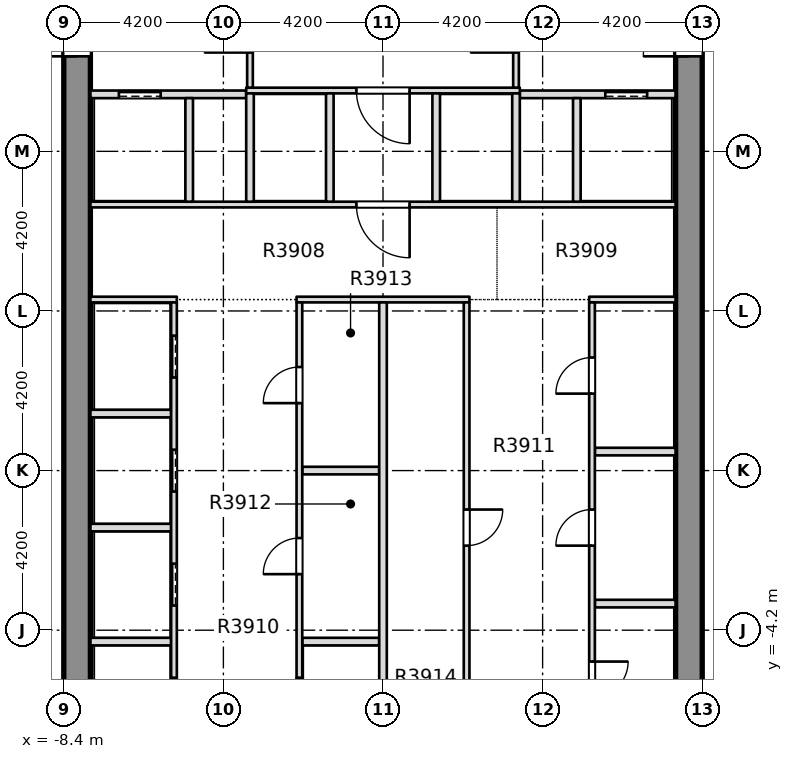
"""IFC4 building model, lengths in metres.
Left out: names, types, materials, properties, quantities, classifications, styles, units other than length and angle.
Written with IfcOpenShell. Run it as: python <this file> out.ifc"""

import sys

from ifc_helpers import new_model, si_unit, direction, frame, frame_2d, origin, place, context, subcontext, project, spatial, rectangle, extrude, element, fill, save


model = new_model("IFC4")
c1 = context("Model", 3, precision=1e-05, world=origin(), true_north=direction((0.0, 1.0)))
c2 = subcontext(c1, "Body", "Model", "MODEL_VIEW")
j1 = project(units=[si_unit("LENGTHUNIT", "METRE"), si_unit("PLANEANGLEUNIT", "RADIAN")], contexts=[c1])
p1 = place(None, origin())
s1 = spatial("IfcSite", under=j1, at=p1, CompositionType="ELEMENT")
p2 = place(p1, origin())
s2 = spatial("IfcBuilding", under=s1, at=p2, CompositionType="ELEMENT")
p3 = place(p2, frame((0.0, 0.0, 153.8)))
s3 = spatial("IfcBuildingStorey", under=s2, at=p3, CompositionType="ELEMENT", Elevation=153.8)
p4 = place(p3, frame((8.05, -8.4, -0.4), z_axis=(0.0, 0.0, 1.0), x_axis=(0.0, 1.0, 0.0)))
e1 = element("IfcWall", 1, at=p4, inside=s3, PredefinedType="SOLIDWALL", context=c2, shape_type="SweptSolid", body=[
    extrude(rectangle(XDim=30.15, YDim=0.7, at=frame_2d((15.075, 0.0))), origin(), (0.0, 0.0, 1.0), 3.45),
])
p5 = place(p4, frame((19.3, 0.0, 0.4)))
e2 = element("IfcOpeningElement", 2, at=p5, cuts=e1, PredefinedType="OPENING", context=c2, shape_type="SweptSolid", body=[
    extrude(rectangle(XDim=1.2, YDim=2.1, at=frame_2d((0.6, 1.05))), frame((0.0, 0.36, 0.0), z_axis=(0.0, -1.0, 0.0), x_axis=(1.0, 0.0, 0.0)), (0.0, 0.0, 1.0), 0.72),
])
p6 = place(p3, frame((-8.05, -8.4, -0.4), z_axis=(0.0, 0.0, 1.0), x_axis=(0.0, 1.0, 0.0)))
e3 = element("IfcWall", 3, at=p6, inside=s3, PredefinedType="SOLIDWALL", context=c2, shape_type="SweptSolid", body=[
    extrude(rectangle(XDim=30.15, YDim=0.7, at=frame_2d((15.075, 0.0))), origin(), (0.0, 0.0, 1.0), 3.45),
])
p7 = place(p6, frame((19.3, 0.0, 0.4)))
e4 = element("IfcOpeningElement", 4, at=p7, cuts=e3, PredefinedType="OPENING", context=c2, shape_type="SweptSolid", body=[
    extrude(rectangle(XDim=1.2, YDim=2.1, at=frame_2d((0.6, 1.05))), frame((0.0, 0.36, 0.0), z_axis=(0.0, -1.0, 0.0), x_axis=(1.0, 0.0, 0.0)), (0.0, 0.0, 1.0), 0.72),
])
p8 = place(p3, frame((-7.699, -4.5, 0.0), z_axis=(0.0, 0.0, 1.0), x_axis=(1.0, 0.0, 0.0)))
e5 = element("IfcWall", 5, at=p8, inside=s3, PredefinedType="PARTITIONING", context=c2, shape_type="SweptSolid", body=[
    extrude(rectangle(XDim=2.124, YDim=0.2, at=frame_2d((1.062, 0.0))), origin(), (0.0, 0.0, 1.0), 3.05),
])
p9 = place(p3, frame((-2.125, -4.5, 0.0), z_axis=(0.0, 0.0, 1.0), x_axis=(1.0, 0.0, 0.0)))
e6 = element("IfcWall", 6, at=p9, inside=s3, PredefinedType="PARTITIONING", context=c2, shape_type="SweptSolid", body=[
    extrude(rectangle(XDim=2.025, YDim=0.2, at=frame_2d((1.012, 0.0))), origin(), (0.0, 0.0, 1.0), 3.05),
])
for number, where, z_axis, x_axis in (
    (7, (5.575, -3.5, 0.0), (0.0, 0.0, 1.0), (1.0, 0.0, 0.0)),
    (8, (-7.699, -1.5, 0.0), (0.0, 0.0, 1.0), (1.0, 0.0, 0.0)),
):
    element("IfcWall", number, at=place(p3, frame(where, z_axis=z_axis, x_axis=x_axis)), inside=s3, PredefinedType="PARTITIONING", context=c2, shape_type="SweptSolid", body=[
        extrude(rectangle(XDim=2.124, YDim=0.2, at=frame_2d((1.062, 0.0))), origin(), (0.0, 0.0, 1.0), 3.05),
    ])
p10 = place(p3, frame((-2.125, 0.0, 0.0), z_axis=(0.0, 0.0, 1.0), x_axis=(1.0, 0.0, 0.0)))
e9 = element("IfcWall", 9, at=p10, inside=s3, PredefinedType="PARTITIONING", context=c2, shape_type="SweptSolid", body=[
    extrude(rectangle(XDim=2.025, YDim=0.2, at=frame_2d((1.012, 0.0))), origin(), (0.0, 0.0, 1.0), 3.05),
])
for number, where, z_axis, x_axis in (
    (10, (5.575, 0.5, 0.0), (0.0, 0.0, 1.0), (1.0, 0.0, 0.0)),
    (11, (-7.699, 1.5, 0.0), (0.0, 0.0, 1.0), (1.0, 0.0, 0.0)),
):
    element("IfcWall", number, at=place(p3, frame(where, z_axis=z_axis, x_axis=x_axis)), inside=s3, PredefinedType="PARTITIONING", context=c2, shape_type="SweptSolid", body=[
        extrude(rectangle(XDim=2.124, YDim=0.2, at=frame_2d((1.062, 0.0))), origin(), (0.0, 0.0, 1.0), 3.05),
    ])
p11 = place(p3, frame((-7.699, 4.5, 0.0), z_axis=(0.0, 0.0, 1.0), x_axis=(1.0, 0.0, 0.0)))
e12 = element("IfcWall", 12, at=p11, inside=s3, PredefinedType="PARTITIONING", context=c2, shape_type="SweptSolid", body=[
    extrude(rectangle(XDim=2.274, YDim=0.15, at=frame_2d((1.137, 0.0))), origin(), (0.0, 0.0, 1.0), 3.05),
])
p12 = place(p3, frame((-2.275, 4.5, 0.0), z_axis=(0.0, 0.0, 1.0), x_axis=(1.0, 0.0, 0.0)))
e13 = element("IfcWall", 13, at=p12, inside=s3, PredefinedType="PARTITIONING", context=c2, shape_type="SweptSolid", body=[
    extrude(rectangle(XDim=4.55, YDim=0.15, at=frame_2d((2.275, 0.0))), origin(), (0.0, 0.0, 1.0), 3.05),
])
p13 = place(p3, frame((5.425, 4.5, 0.0), z_axis=(0.0, 0.0, 1.0), x_axis=(1.0, 0.0, 0.0)))
e14 = element("IfcWall", 14, at=p13, inside=s3, PredefinedType="PARTITIONING", context=c2, shape_type="SweptSolid", body=[
    extrude(rectangle(XDim=2.274, YDim=0.15, at=frame_2d((1.137, 0.0))), origin(), (0.0, 0.0, 1.0), 3.05),
])
p14 = place(p3, frame((-7.699, 7.0, 0.0), z_axis=(0.0, 0.0, 1.0), x_axis=(1.0, 0.0, 0.0)))
e15 = element("IfcWall", 15, at=p14, inside=s3, PredefinedType="PARTITIONING", context=c2, shape_type="SweptSolid", body=[
    extrude(rectangle(XDim=15.398, YDim=0.15, at=frame_2d((7.699, 0.0))), origin(), (0.0, 0.0, 1.0), 3.05),
])
p15 = place(p14, frame((6.999, 0.0, 0.0)))
e16 = element("IfcOpeningElement", 16, at=p15, cuts=e15, PredefinedType="OPENING", context=c2, shape_type="SweptSolid", body=[
    extrude(rectangle(XDim=1.4, YDim=2.1, at=frame_2d((0.7, 1.05))), frame((0.0, 0.085, 0.0), z_axis=(0.0, -1.0, 0.0), x_axis=(1.0, 0.0, 0.0)), (0.0, 0.0, 1.0), 0.17),
])
p16 = place(p3, frame((-7.699, 9.9, 0.0), z_axis=(0.0, 0.0, 1.0), x_axis=(1.0, 0.0, 0.0)))
e17 = element("IfcWall", 17, at=p16, inside=s3, PredefinedType="PARTITIONING", context=c2, shape_type="SweptSolid", body=[
    extrude(rectangle(XDim=4.099, YDim=0.2, at=frame_2d((2.049, 0.0))), origin(), (0.0, 0.0, 1.0), 3.05),
])
p17 = place(p16, frame((0.749, 0.0, 0.0)))
e18 = element("IfcOpeningElement", 18, at=p17, cuts=e17, PredefinedType="OPENING", context=c2, shape_type="SweptSolid", body=[
    extrude(rectangle(XDim=1.1, YDim=2.1, at=frame_2d((0.55, 1.05))), frame((0.0, 0.11, 0.0), z_axis=(0.0, -1.0, 0.0), x_axis=(1.0, 0.0, 0.0)), (0.0, 0.0, 1.0), 0.22),
])
p18 = place(p3, frame((3.6, 9.9, 0.0), z_axis=(0.0, 0.0, 1.0), x_axis=(1.0, 0.0, 0.0)))
e19 = element("IfcWall", 19, at=p18, inside=s3, PredefinedType="PARTITIONING", context=c2, shape_type="SweptSolid", body=[
    extrude(rectangle(XDim=4.099, YDim=0.2, at=frame_2d((2.049, 0.0))), origin(), (0.0, 0.0, 1.0), 3.05),
])
p19 = place(p18, frame((2.25, 0.0, 0.0)))
e20 = element("IfcOpeningElement", 20, at=p19, cuts=e19, PredefinedType="OPENING", context=c2, shape_type="SweptSolid", body=[
    extrude(rectangle(XDim=1.1, YDim=2.1, at=frame_2d((0.55, 1.05))), frame((0.0, 0.11, 0.0), z_axis=(0.0, -1.0, 0.0), x_axis=(1.0, 0.0, 0.0)), (0.0, 0.0, 1.0), 0.22),
])
p20 = place(p3, frame((-3.6, 10.0, 0.0), z_axis=(0.0, 0.0, 1.0), x_axis=(1.0, 0.0, 0.0)))
e21 = element("IfcWall", 21, at=p20, inside=s3, PredefinedType="PARTITIONING", context=c2, shape_type="SweptSolid", body=[
    extrude(rectangle(XDim=7.2, YDim=0.15, at=frame_2d((3.6, 0.0))), origin(), (0.0, 0.0, 1.0), 3.05),
])
p21 = place(p20, frame((2.9, 0.0, 0.0)))
e22 = element("IfcOpeningElement", 22, at=p21, cuts=e21, PredefinedType="OPENING", context=c2, shape_type="SweptSolid", body=[
    extrude(rectangle(XDim=1.4, YDim=2.1, at=frame_2d((0.7, 1.05))), frame((0.0, 0.085, 0.0), z_axis=(0.0, -1.0, 0.0), x_axis=(1.0, 0.0, 0.0)), (0.0, 0.0, 1.0), 0.17),
])
p22 = place(p3, frame((-5.5, -7.699, 0.0), z_axis=(0.0, 0.0, 1.0), x_axis=(0.0, 1.0, 0.0)))
e23 = element("IfcWall", 23, at=p22, inside=s3, PredefinedType="PARTITIONING", context=c2, shape_type="SweptSolid", body=[
    extrude(rectangle(XDim=12.124, YDim=0.15, at=frame_2d((6.062, 0.0))), origin(), (0.0, 0.0, 1.0), 3.05),
])
p23 = place(p22, frame((1.149, 0.0, 0.0)))
e24 = element("IfcOpeningElement", 24, at=p23, cuts=e23, PredefinedType="OPENING", context=c2, shape_type="SweptSolid", body=[
    extrude(rectangle(XDim=1.1, YDim=2.1, at=frame_2d((0.55, 1.05))), frame((0.0, 0.085, 0.0), z_axis=(0.0, -1.0, 0.0), x_axis=(1.0, 0.0, 0.0)), (0.0, 0.0, 1.0), 0.17),
])
p24 = place(p22, frame((4.149, 0.0, 0.0)))
e25 = element("IfcOpeningElement", 25, at=p24, cuts=e23, PredefinedType="OPENING", context=c2, shape_type="SweptSolid", body=[
    extrude(rectangle(XDim=1.1, YDim=2.1, at=frame_2d((0.55, 1.05))), frame((0.0, 0.085, 0.0), z_axis=(0.0, -1.0, 0.0), x_axis=(1.0, 0.0, 0.0)), (0.0, 0.0, 1.0), 0.17),
])
p25 = place(p22, frame((7.149, 0.0, 0.0)))
e26 = element("IfcOpeningElement", 26, at=p25, cuts=e23, PredefinedType="OPENING", context=c2, shape_type="SweptSolid", body=[
    extrude(rectangle(XDim=1.1, YDim=2.1, at=frame_2d((0.55, 1.05))), frame((0.0, 0.085, 0.0), z_axis=(0.0, -1.0, 0.0), x_axis=(1.0, 0.0, 0.0)), (0.0, 0.0, 1.0), 0.17),
])
p26 = place(p22, frame((10.149, 0.0, 0.0)))
e27 = element("IfcOpeningElement", 27, at=p26, cuts=e23, PredefinedType="OPENING", context=c2, shape_type="SweptSolid", body=[
    extrude(rectangle(XDim=1.1, YDim=2.1, at=frame_2d((0.55, 1.05))), frame((0.0, 0.085, 0.0), z_axis=(0.0, -1.0, 0.0), x_axis=(1.0, 0.0, 0.0)), (0.0, 0.0, 1.0), 0.17),
])
p27 = place(p3, frame((-5.1, 7.075, 0.0), z_axis=(0.0, 0.0, 1.0), x_axis=(0.0, 1.0, 0.0)))
e28 = element("IfcWall", 28, at=p27, inside=s3, PredefinedType="PARTITIONING", context=c2, shape_type="SweptSolid", body=[
    extrude(rectangle(XDim=2.725, YDim=0.2, at=frame_2d((1.363, 0.0))), origin(), (0.0, 0.0, 1.0), 3.05),
])
p28 = place(p3, frame((-3.5, 7.075, 0.0), z_axis=(0.0, 0.0, 1.0), x_axis=(0.0, 1.0, 0.0)))
e29 = element("IfcWall", 29, at=p28, inside=s3, PredefinedType="PARTITIONING", context=c2, shape_type="SweptSolid", body=[
    extrude(rectangle(XDim=2.85, YDim=0.2, at=frame_2d((1.425, 0.0))), origin(), (0.0, 0.0, 1.0), 3.05),
])
p29 = place(p3, frame((-3.5, 10.075, 0.0), z_axis=(0.0, 0.0, 1.0), x_axis=(0.0, 1.0, 0.0)))
e30 = element("IfcWall", 30, at=p29, inside=s3, PredefinedType="PARTITIONING", context=c2, shape_type="SweptSolid", body=[
    extrude(rectangle(XDim=3.075, YDim=0.15, at=frame_2d((1.538, 0.0))), origin(), (0.0, 0.0, 1.0), 3.05),
])
p30 = place(p29, frame((0.925, 0.0, 0.0)))
e31 = element("IfcOpeningElement", 31, at=p30, cuts=e30, PredefinedType="OPENING", context=c2, shape_type="SweptSolid", body=[
    extrude(rectangle(XDim=1.2, YDim=2.1, at=frame_2d((0.6, 1.05))), frame((0.0, 0.085, 0.0), z_axis=(0.0, -1.0, 0.0), x_axis=(1.0, 0.0, 0.0)), (0.0, 0.0, 1.0), 0.17),
])
p31 = place(p3, frame((-2.2, -7.699, 0.0), z_axis=(0.0, 0.0, 1.0), x_axis=(0.0, 1.0, 0.0)))
e32 = element("IfcWall", 32, at=p31, inside=s3, PredefinedType="PARTITIONING", context=c2, shape_type="SweptSolid", body=[
    extrude(rectangle(XDim=12.124, YDim=0.15, at=frame_2d((6.062, 0.0))), origin(), (0.0, 0.0, 1.0), 3.05),
])
p32 = place(p31, frame((1.149, 0.0, 0.0)))
e33 = element("IfcOpeningElement", 33, at=p32, cuts=e32, PredefinedType="OPENING", context=c2, shape_type="SweptSolid", body=[
    extrude(rectangle(XDim=1.1, YDim=2.1, at=frame_2d((0.55, 1.05))), frame((0.0, 0.085, 0.0), z_axis=(0.0, -1.0, 0.0), x_axis=(1.0, 0.0, 0.0)), (0.0, 0.0, 1.0), 0.17),
])
p33 = place(p31, frame((4.974, 0.0, 0.0)))
e34 = element("IfcOpeningElement", 34, at=p33, cuts=e32, PredefinedType="OPENING", context=c2, shape_type="SweptSolid", body=[
    extrude(rectangle(XDim=0.95, YDim=2.1, at=frame_2d((0.475, 1.05))), frame((0.0, 0.085, 0.0), z_axis=(0.0, -1.0, 0.0), x_axis=(1.0, 0.0, 0.0)), (0.0, 0.0, 1.0), 0.17),
])
p34 = place(p31, frame((9.474, 0.0, 0.0)))
e35 = element("IfcOpeningElement", 35, at=p34, cuts=e32, PredefinedType="OPENING", context=c2, shape_type="SweptSolid", body=[
    extrude(rectangle(XDim=0.95, YDim=2.1, at=frame_2d((0.475, 1.05))), frame((0.0, 0.085, 0.0), z_axis=(0.0, -1.0, 0.0), x_axis=(1.0, 0.0, 0.0)), (0.0, 0.0, 1.0), 0.17),
])
p35 = place(p3, frame((-1.4, 7.075, 0.0), z_axis=(0.0, 0.0, 1.0), x_axis=(0.0, 1.0, 0.0)))
e36 = element("IfcWall", 36, at=p35, inside=s3, PredefinedType="PARTITIONING", context=c2, shape_type="SweptSolid", body=[
    extrude(rectangle(XDim=2.85, YDim=0.2, at=frame_2d((1.425, 0.0))), origin(), (0.0, 0.0, 1.0), 3.05),
])
p36 = place(p3, frame((0.0, -7.699, 0.0), z_axis=(0.0, 0.0, 1.0), x_axis=(0.0, 1.0, 0.0)))
e37 = element("IfcWall", 37, at=p36, inside=s3, PredefinedType="PARTITIONING", context=c2, shape_type="SweptSolid", body=[
    extrude(rectangle(XDim=12.124, YDim=0.2, at=frame_2d((6.062, 0.0))), origin(), (0.0, 0.0, 1.0), 3.05),
])
p37 = place(p3, frame((1.4, 7.075, 0.0), z_axis=(0.0, 0.0, 1.0), x_axis=(0.0, 1.0, 0.0)))
e38 = element("IfcWall", 38, at=p37, inside=s3, PredefinedType="PARTITIONING", context=c2, shape_type="SweptSolid", body=[
    extrude(rectangle(XDim=2.85, YDim=0.2, at=frame_2d((1.425, 0.0))), origin(), (0.0, 0.0, 1.0), 3.05),
])
p38 = place(p3, frame((2.2, -7.699, 0.0), z_axis=(0.0, 0.0, 1.0), x_axis=(0.0, 1.0, 0.0)))
e39 = element("IfcWall", 39, at=p38, inside=s3, PredefinedType="PARTITIONING", context=c2, shape_type="SweptSolid", body=[
    extrude(rectangle(XDim=12.124, YDim=0.15, at=frame_2d((6.062, 0.0))), origin(), (0.0, 0.0, 1.0), 3.05),
])
p39 = place(p38, frame((5.724, 0.0, 0.0)))
e40 = element("IfcOpeningElement", 40, at=p39, cuts=e39, PredefinedType="OPENING", context=c2, shape_type="SweptSolid", body=[
    extrude(rectangle(XDim=0.95, YDim=2.1, at=frame_2d((0.475, 1.05))), frame((0.0, 0.085, 0.0), z_axis=(0.0, -1.0, 0.0), x_axis=(1.0, 0.0, 0.0)), (0.0, 0.0, 1.0), 0.17),
])
p40 = place(p3, frame((3.5, 7.075, 0.0), z_axis=(0.0, 0.0, 1.0), x_axis=(0.0, 1.0, 0.0)))
e41 = element("IfcWall", 41, at=p40, inside=s3, PredefinedType="PARTITIONING", context=c2, shape_type="SweptSolid", body=[
    extrude(rectangle(XDim=2.85, YDim=0.2, at=frame_2d((1.425, 0.0))), origin(), (0.0, 0.0, 1.0), 3.05),
])
p41 = place(p3, frame((3.5, 10.075, 0.0), z_axis=(0.0, 0.0, 1.0), x_axis=(0.0, 1.0, 0.0)))
e42 = element("IfcWall", 42, at=p41, inside=s3, PredefinedType="PARTITIONING", context=c2, shape_type="SweptSolid", body=[
    extrude(rectangle(XDim=3.075, YDim=0.15, at=frame_2d((1.538, 0.0))), origin(), (0.0, 0.0, 1.0), 3.05),
])
p42 = place(p41, frame((0.925, 0.0, 0.0)))
e43 = element("IfcOpeningElement", 43, at=p42, cuts=e42, PredefinedType="OPENING", context=c2, shape_type="SweptSolid", body=[
    extrude(rectangle(XDim=1.2, YDim=2.1, at=frame_2d((0.6, 1.05))), frame((0.0, 0.085, 0.0), z_axis=(0.0, -1.0, 0.0), x_axis=(1.0, 0.0, 0.0)), (0.0, 0.0, 1.0), 0.17),
])
p43 = place(p3, frame((5.1, 7.075, 0.0), z_axis=(0.0, 0.0, 1.0), x_axis=(0.0, 1.0, 0.0)))
e44 = element("IfcWall", 44, at=p43, inside=s3, PredefinedType="PARTITIONING", context=c2, shape_type="SweptSolid", body=[
    extrude(rectangle(XDim=2.725, YDim=0.2, at=frame_2d((1.363, 0.0))), origin(), (0.0, 0.0, 1.0), 3.05),
])
p44 = place(p3, frame((5.5, -7.699, 0.0), z_axis=(0.0, 0.0, 1.0), x_axis=(0.0, 1.0, 0.0)))
e45 = element("IfcWall", 45, at=p44, inside=s3, PredefinedType="PARTITIONING", context=c2, shape_type="SweptSolid", body=[
    extrude(rectangle(XDim=12.124, YDim=0.15, at=frame_2d((6.062, 0.0))), origin(), (0.0, 0.0, 1.0), 3.05),
])
p45 = place(p44, frame((1.724, 0.0, 0.0)))
e46 = element("IfcOpeningElement", 46, at=p45, cuts=e45, PredefinedType="OPENING", context=c2, shape_type="SweptSolid", body=[
    extrude(rectangle(XDim=0.95, YDim=2.1, at=frame_2d((0.475, 1.05))), frame((0.0, 0.085, 0.0), z_axis=(0.0, -1.0, 0.0), x_axis=(1.0, 0.0, 0.0)), (0.0, 0.0, 1.0), 0.17),
])
p46 = place(p44, frame((5.724, 0.0, 0.0)))
e47 = element("IfcOpeningElement", 47, at=p46, cuts=e45, PredefinedType="OPENING", context=c2, shape_type="SweptSolid", body=[
    extrude(rectangle(XDim=0.95, YDim=2.1, at=frame_2d((0.475, 1.05))), frame((0.0, 0.085, 0.0), z_axis=(0.0, -1.0, 0.0), x_axis=(1.0, 0.0, 0.0)), (0.0, 0.0, 1.0), 0.17),
])
p47 = place(p44, frame((9.724, 0.0, 0.0)))
e48 = element("IfcOpeningElement", 48, at=p47, cuts=e45, PredefinedType="OPENING", context=c2, shape_type="SweptSolid", body=[
    extrude(rectangle(XDim=0.95, YDim=2.1, at=frame_2d((0.475, 1.05))), frame((0.0, 0.085, 0.0), z_axis=(0.0, -1.0, 0.0), x_axis=(1.0, 0.0, 0.0)), (0.0, 0.0, 1.0), 0.17),
])
p48 = place(p23, origin())
e49 = element("IfcDoor", 49, at=p48, inside=s3, OperationType="SLIDING_TO_LEFT", PredefinedType="DOOR", context=c2, shape_type="SweptSolid", body=[
    extrude(rectangle(XDim=1.1, YDim=2.1, at=frame_2d((0.55, 1.05))), frame((0.0, 0.025, 0.0), z_axis=(0.0, -1.0, 0.0), x_axis=(1.0, 0.0, 0.0)), (0.0, 0.0, 1.0), 0.05),
])
fill(e24, e49)
p49 = place(p24, origin())
e50 = element("IfcDoor", 50, at=p49, inside=s3, OperationType="SLIDING_TO_LEFT", PredefinedType="DOOR", context=c2, shape_type="SweptSolid", body=[
    extrude(rectangle(XDim=1.1, YDim=2.1, at=frame_2d((0.55, 1.05))), frame((0.0, 0.025, 0.0), z_axis=(0.0, -1.0, 0.0), x_axis=(1.0, 0.0, 0.0)), (0.0, 0.0, 1.0), 0.05),
])
fill(e25, e50)
p50 = place(p25, origin())
e51 = element("IfcDoor", 51, at=p50, inside=s3, OperationType="SLIDING_TO_LEFT", PredefinedType="DOOR", context=c2, shape_type="SweptSolid", body=[
    extrude(rectangle(XDim=1.1, YDim=2.1, at=frame_2d((0.55, 1.05))), frame((0.0, 0.025, 0.0), z_axis=(0.0, -1.0, 0.0), x_axis=(1.0, 0.0, 0.0)), (0.0, 0.0, 1.0), 0.05),
])
fill(e26, e51)
p51 = place(p26, origin())
e52 = element("IfcDoor", 52, at=p51, inside=s3, OperationType="SLIDING_TO_LEFT", PredefinedType="DOOR", context=c2, shape_type="SweptSolid", body=[
    extrude(rectangle(XDim=1.1, YDim=2.1, at=frame_2d((0.55, 1.05))), frame((0.0, 0.025, 0.0), z_axis=(0.0, -1.0, 0.0), x_axis=(1.0, 0.0, 0.0)), (0.0, 0.0, 1.0), 0.05),
])
fill(e27, e52)
p52 = place(p32, origin())
e53 = element("IfcDoor", 53, at=p52, inside=s3, OperationType="SLIDING_TO_LEFT", PredefinedType="DOOR", context=c2, shape_type="SweptSolid", body=[
    extrude(rectangle(XDim=1.1, YDim=2.1, at=frame_2d((0.55, 1.05))), frame((0.0, 0.025, 0.0), z_axis=(0.0, -1.0, 0.0), x_axis=(1.0, 0.0, 0.0)), (0.0, 0.0, 1.0), 0.05),
])
fill(e33, e53)
p53 = place(p33, origin())
e54 = element("IfcDoor", 54, at=p53, inside=s3, OperationType="SINGLE_SWING_LEFT", PredefinedType="DOOR", context=c2, shape_type="SweptSolid", body=[
    extrude(rectangle(XDim=0.95, YDim=2.1, at=frame_2d((0.475, 1.05))), frame((0.0, 0.025, 0.0), z_axis=(0.0, -1.0, 0.0), x_axis=(1.0, 0.0, 0.0)), (0.0, 0.0, 1.0), 0.05),
])
fill(e34, e54)
p54 = place(p34, origin())
e55 = element("IfcDoor", 55, at=p54, inside=s3, OperationType="SINGLE_SWING_RIGHT", PredefinedType="DOOR", context=c2, shape_type="SweptSolid", body=[
    extrude(rectangle(XDim=0.95, YDim=2.1, at=frame_2d((0.475, 1.05))), frame((0.0, 0.025, 0.0), z_axis=(0.0, -1.0, 0.0), x_axis=(1.0, 0.0, 0.0)), (0.0, 0.0, 1.0), 0.05),
])
fill(e35, e55)
p55 = place(p39, origin())
e56 = element("IfcDoor", 56, at=p55, inside=s3, OperationType="SINGLE_SWING_RIGHT", PredefinedType="DOOR", context=c2, shape_type="SweptSolid", body=[
    extrude(rectangle(XDim=0.95, YDim=2.1, at=frame_2d((0.475, 1.05))), frame((0.0, 0.025, 0.0), z_axis=(0.0, -1.0, 0.0), x_axis=(1.0, 0.0, 0.0)), (0.0, 0.0, 1.0), 0.05),
])
fill(e40, e56)
p56 = place(p45, origin())
e57 = element("IfcDoor", 57, at=p56, inside=s3, OperationType="SINGLE_SWING_LEFT", PredefinedType="DOOR", context=c2, shape_type="SweptSolid", body=[
    extrude(rectangle(XDim=0.95, YDim=2.1, at=frame_2d((0.475, 1.05))), frame((0.0, 0.025, 0.0), z_axis=(0.0, -1.0, 0.0), x_axis=(1.0, 0.0, 0.0)), (0.0, 0.0, 1.0), 0.05),
])
fill(e46, e57)
p57 = place(p46, origin())
e58 = element("IfcDoor", 58, at=p57, inside=s3, OperationType="SINGLE_SWING_LEFT", PredefinedType="DOOR", context=c2, shape_type="SweptSolid", body=[
    extrude(rectangle(XDim=0.95, YDim=2.1, at=frame_2d((0.475, 1.05))), frame((0.0, 0.025, 0.0), z_axis=(0.0, -1.0, 0.0), x_axis=(1.0, 0.0, 0.0)), (0.0, 0.0, 1.0), 0.05),
])
fill(e47, e58)
p58 = place(p47, origin())
e59 = element("IfcDoor", 59, at=p58, inside=s3, OperationType="SINGLE_SWING_RIGHT", PredefinedType="DOOR", context=c2, shape_type="SweptSolid", body=[
    extrude(rectangle(XDim=0.95, YDim=2.1, at=frame_2d((0.475, 1.05))), frame((0.0, 0.025, 0.0), z_axis=(0.0, -1.0, 0.0), x_axis=(1.0, 0.0, 0.0)), (0.0, 0.0, 1.0), 0.05),
])
fill(e48, e59)
p59 = place(p17, origin())
e60 = element("IfcDoor", 60, at=p59, inside=s3, OperationType="SLIDING_TO_RIGHT", PredefinedType="DOOR", context=c2, shape_type="SweptSolid", body=[
    extrude(rectangle(XDim=1.1, YDim=2.1, at=frame_2d((0.55, 1.05))), frame((0.0, 0.025, 0.0), z_axis=(0.0, -1.0, 0.0), x_axis=(1.0, 0.0, 0.0)), (0.0, 0.0, 1.0), 0.05),
])
fill(e18, e60)
p60 = place(p19, origin())
e61 = element("IfcDoor", 61, at=p60, inside=s3, OperationType="SLIDING_TO_LEFT", PredefinedType="DOOR", context=c2, shape_type="SweptSolid", body=[
    extrude(rectangle(XDim=1.1, YDim=2.1, at=frame_2d((0.55, 1.05))), frame((0.0, 0.025, 0.0), z_axis=(0.0, -1.0, 0.0), x_axis=(1.0, 0.0, 0.0)), (0.0, 0.0, 1.0), 0.05),
])
fill(e20, e61)
p61 = place(p15, origin())
e62 = element("IfcDoor", 62, at=p61, inside=s3, OperationType="SINGLE_SWING_RIGHT", PredefinedType="DOOR", context=c2, shape_type="SweptSolid", body=[
    extrude(rectangle(XDim=1.4, YDim=2.1, at=frame_2d((0.7, 1.05))), frame((0.0, 0.025, 0.0), z_axis=(0.0, -1.0, 0.0), x_axis=(1.0, 0.0, 0.0)), (0.0, 0.0, 1.0), 0.05),
])
fill(e16, e62)
p62 = place(p21, origin())
e63 = element("IfcDoor", 63, at=p62, inside=s3, OperationType="SINGLE_SWING_RIGHT", PredefinedType="DOOR", context=c2, shape_type="SweptSolid", body=[
    extrude(rectangle(XDim=1.4, YDim=2.1, at=frame_2d((0.7, 1.05))), frame((0.0, 0.025, 0.0), z_axis=(0.0, -1.0, 0.0), x_axis=(1.0, 0.0, 0.0)), (0.0, 0.0, 1.0), 0.05),
])
fill(e22, e63)
p63 = place(p7, origin())
e64 = element("IfcDoor", 64, at=p63, inside=s3, OperationType="SINGLE_SWING_LEFT", PredefinedType="DOOR", context=c2, shape_type="SweptSolid", body=[
    extrude(rectangle(XDim=1.2, YDim=2.1, at=frame_2d((0.6, 1.05))), frame((0.0, 0.025, 0.0), z_axis=(0.0, -1.0, 0.0), x_axis=(1.0, 0.0, 0.0)), (0.0, 0.0, 1.0), 0.05),
])
fill(e4, e64)
p64 = place(p5, origin())
e65 = element("IfcDoor", 65, at=p64, inside=s3, OperationType="SINGLE_SWING_LEFT", PredefinedType="DOOR", context=c2, shape_type="SweptSolid", body=[
    extrude(rectangle(XDim=1.2, YDim=2.1, at=frame_2d((0.6, 1.05))), frame((0.0, 0.025, 0.0), z_axis=(0.0, -1.0, 0.0), x_axis=(1.0, 0.0, 0.0)), (0.0, 0.0, 1.0), 0.05),
])
fill(e2, e65)
save(model, sys.argv[1])
